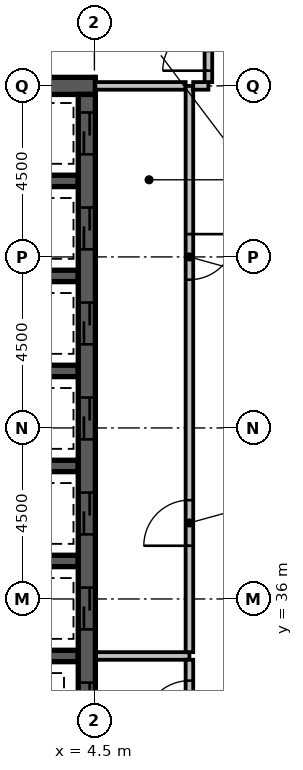
"""IFC4 building model, lengths in metres.
Left out: names, types, materials, properties, quantities, classifications, styles, units other than length and angle.
Written with IfcOpenShell. Run it as: python <this file> out.ifc"""

import sys

from ifc_helpers import new_model, si_unit, direction, frame, frame_2d, origin, place, context, subcontext, project, spatial, rectangle, extrude, element, fill, save


model = new_model("IFC4")
c1 = context("Model", 3, precision=1e-05, world=origin(), true_north=direction((0.0, 1.0)))
c2 = subcontext(c1, "Body", "Model", "MODEL_VIEW")
j1 = project(units=[si_unit("LENGTHUNIT", "METRE"), si_unit("PLANEANGLEUNIT", "RADIAN")], contexts=[c1])
p1 = place(None, origin())
s1 = spatial("IfcSite", under=j1, at=p1, CompositionType="ELEMENT")
p2 = place(p1, origin())
s2 = spatial("IfcBuilding", under=s1, at=p2, CompositionType="ELEMENT")
p3 = place(p2, frame((0.0, 0.0, 218.6)))
s3 = spatial("IfcBuildingStorey", under=s2, at=p3, CompositionType="ELEMENT", Elevation=218.6)
p4 = place(p3, frame((0.275, 49.5, -0.3), z_axis=(0.0, 0.0, 1.0), x_axis=(1.0, 0.0, 0.0)))
e1 = element("IfcWall", 1, at=p4, inside=s3, PredefinedType="SHEAR", context=c2, shape_type="SweptSolid", body=[
    extrude(rectangle(XDim=4.25, YDim=0.45, at=frame_2d((2.125, 0.0))), origin(), (0.0, 0.0, 1.0), 3.6),
])
for number, where, z_axis, x_axis in (
    (2, (0.725, 34.5, -0.3), (0.0, 0.0, 1.0), (1.0, 0.0, 0.0)),
    (3, (0.725, 37.0, -0.3), (0.0, 0.0, 1.0), (1.0, 0.0, 0.0)),
    (4, (0.725, 39.5, -0.3), (0.0, 0.0, 1.0), (1.0, 0.0, 0.0)),
    (5, (0.725, 42.0, -0.3), (0.0, 0.0, 1.0), (1.0, 0.0, 0.0)),
    (6, (0.725, 44.5, -0.3), (0.0, 0.0, 1.0), (1.0, 0.0, 0.0)),
    (7, (0.725, 47.0, -0.3), (0.0, 0.0, 1.0), (1.0, 0.0, 0.0)),
):
    element("IfcWall", number, at=place(p3, frame(where, z_axis=z_axis, x_axis=x_axis)), inside=s3, PredefinedType="SHEAR", context=c2, shape_type="SweptSolid", body=[
        extrude(rectangle(XDim=3.35, YDim=0.3, at=frame_2d((1.675, 0.0))), origin(), (0.0, 0.0, 1.0), 3.6),
    ])
p5 = place(p3, frame((4.3, 27.15, -0.3), z_axis=(0.0, 0.0, 1.0), x_axis=(0.0, 1.0, 0.0)))
e8 = element("IfcWall", 8, at=p5, inside=s3, PredefinedType="SHEAR", context=c2, shape_type="SweptSolid", body=[
    extrude(rectangle(XDim=22.125, YDim=0.45, at=frame_2d((11.062, 0.0))), origin(), (0.0, 0.0, 1.0), 3.6),
])
p6 = place(p5, frame((3.05, 0.0, 0.3)))
e9 = element("IfcOpeningElement", 9, at=p6, cuts=e8, PredefinedType="OPENING", context=c2, shape_type="SweptSolid", body=[
    extrude(rectangle(XDim=1.1, YDim=2.1, at=frame_2d((0.55, 1.05))), frame((0.0, 0.237, 0.0), z_axis=(0.0, -1.0, 0.0), x_axis=(1.0, 0.0, 0.0)), (0.0, 0.0, 1.0), 0.474),
])
p7 = place(p5, frame((0.55, 0.0, 0.3)))
e10 = element("IfcOpeningElement", 10, at=p7, cuts=e8, PredefinedType="OPENING", context=c2, shape_type="SweptSolid", body=[
    extrude(rectangle(XDim=1.1, YDim=2.1, at=frame_2d((0.55, 1.05))), frame((0.0, 0.237, 0.0), z_axis=(0.0, -1.0, 0.0), x_axis=(1.0, 0.0, 0.0)), (0.0, 0.0, 1.0), 0.474),
])
p8 = place(p5, frame((20.55, 0.0, 0.3)))
e11 = element("IfcOpeningElement", 11, at=p8, cuts=e8, PredefinedType="OPENING", context=c2, shape_type="SweptSolid", body=[
    extrude(rectangle(XDim=1.1, YDim=2.1, at=frame_2d((0.55, 1.05))), frame((0.0, 0.237, 0.0), z_axis=(0.0, -1.0, 0.0), x_axis=(1.0, 0.0, 0.0)), (0.0, 0.0, 1.0), 0.474),
])
p9 = place(p5, frame((18.05, 0.0, 0.3)))
e12 = element("IfcOpeningElement", 12, at=p9, cuts=e8, PredefinedType="OPENING", context=c2, shape_type="SweptSolid", body=[
    extrude(rectangle(XDim=1.1, YDim=2.1, at=frame_2d((0.55, 1.05))), frame((0.0, 0.237, 0.0), z_axis=(0.0, -1.0, 0.0), x_axis=(1.0, 0.0, 0.0)), (0.0, 0.0, 1.0), 0.474),
])
p10 = place(p5, frame((15.55, 0.0, 0.3)))
e13 = element("IfcOpeningElement", 13, at=p10, cuts=e8, PredefinedType="OPENING", context=c2, shape_type="SweptSolid", body=[
    extrude(rectangle(XDim=1.1, YDim=2.1, at=frame_2d((0.55, 1.05))), frame((0.0, 0.237, 0.0), z_axis=(0.0, -1.0, 0.0), x_axis=(1.0, 0.0, 0.0)), (0.0, 0.0, 1.0), 0.474),
])
p11 = place(p5, frame((13.05, 0.0, 0.3)))
e14 = element("IfcOpeningElement", 14, at=p11, cuts=e8, PredefinedType="OPENING", context=c2, shape_type="SweptSolid", body=[
    extrude(rectangle(XDim=1.1, YDim=2.1, at=frame_2d((0.55, 1.05))), frame((0.0, 0.237, 0.0), z_axis=(0.0, -1.0, 0.0), x_axis=(1.0, 0.0, 0.0)), (0.0, 0.0, 1.0), 0.474),
])
p12 = place(p5, frame((10.55, 0.0, 0.3)))
e15 = element("IfcOpeningElement", 15, at=p12, cuts=e8, PredefinedType="OPENING", context=c2, shape_type="SweptSolid", body=[
    extrude(rectangle(XDim=1.1, YDim=2.1, at=frame_2d((0.55, 1.05))), frame((0.0, 0.237, 0.0), z_axis=(0.0, -1.0, 0.0), x_axis=(1.0, 0.0, 0.0)), (0.0, 0.0, 1.0), 0.474),
])
p13 = place(p5, frame((8.05, 0.0, 0.3)))
e16 = element("IfcOpeningElement", 16, at=p13, cuts=e8, PredefinedType="OPENING", context=c2, shape_type="SweptSolid", body=[
    extrude(rectangle(XDim=1.1, YDim=2.1, at=frame_2d((0.55, 1.05))), frame((0.0, 0.237, 0.0), z_axis=(0.0, -1.0, 0.0), x_axis=(1.0, 0.0, 0.0)), (0.0, 0.0, 1.0), 0.474),
])
p14 = place(p5, frame((5.55, 0.0, 0.3)))
e17 = element("IfcOpeningElement", 17, at=p14, cuts=e8, PredefinedType="OPENING", context=c2, shape_type="SweptSolid", body=[
    extrude(rectangle(XDim=1.1, YDim=2.1, at=frame_2d((0.55, 1.05))), frame((0.0, 0.237, 0.0), z_axis=(0.0, -1.0, 0.0), x_axis=(1.0, 0.0, 0.0)), (0.0, 0.0, 1.0), 0.474),
])
p15 = place(p3, frame((4.545, 34.5, 0.0), z_axis=(0.0, 0.0, 1.0), x_axis=(1.0, 0.0, 0.0)))
e18 = element("IfcWall", 18, at=p15, inside=s3, PredefinedType="PARTITIONING", context=c2, shape_type="SweptSolid", body=[
    extrude(rectangle(XDim=2.455, YDim=0.2, at=frame_2d((1.228, 0.0))), origin(), (0.0, 0.0, 1.0), 3.3),
])
p16 = place(p3, frame((7.0, 34.6, 0.0), z_axis=(0.0, 0.0, 1.0), x_axis=(0.0, 1.0, 0.0)))
e19 = element("IfcWall", 19, at=p16, inside=s3, PredefinedType="PARTITIONING", context=c2, shape_type="SweptSolid", body=[
    extrude(rectangle(XDim=14.9, YDim=0.2, at=frame_2d((7.45, 0.0))), origin(), (0.0, 0.0, 1.0), 3.3),
])
p17 = place(p16, frame((2.8, 0.0, 0.0)))
e20 = element("IfcOpeningElement", 20, at=p17, cuts=e19, PredefinedType="OPENING", context=c2, shape_type="SweptSolid", body=[
    extrude(rectangle(XDim=1.2, YDim=2.1, at=frame_2d((0.6, 1.05))), frame((0.0, 0.112, 0.0), z_axis=(0.0, -1.0, 0.0), x_axis=(1.0, 0.0, 0.0)), (0.0, 0.0, 1.0), 0.224),
])
p18 = place(p16, frame((9.8, 0.0, 0.0)))
e21 = element("IfcOpeningElement", 21, at=p18, cuts=e19, PredefinedType="OPENING", context=c2, shape_type="SweptSolid", body=[
    extrude(rectangle(XDim=1.2, YDim=2.1, at=frame_2d((0.6, 1.05))), frame((0.0, 0.112, 0.0), z_axis=(0.0, -1.0, 0.0), x_axis=(1.0, 0.0, 0.0)), (0.0, 0.0, 1.0), 0.224),
])
p19 = place(p3, frame((4.525, 49.5, 0.0), z_axis=(0.0, 0.0, 1.0), x_axis=(1.0, 0.0, 0.0)))
e22 = element("IfcWall", 22, at=p19, inside=s3, PredefinedType="PARTITIONING", context=c2, shape_type="SweptSolid", body=[
    extrude(rectangle(XDim=2.375, YDim=0.2, at=frame_2d((1.188, 0.0))), origin(), (0.0, 0.0, 1.0), 3.3),
])
p20 = place(p3, frame((7.0, 32.1, 0.0), z_axis=(0.0, 0.0, 1.0), x_axis=(0.0, 1.0, 0.0)))
e23 = element("IfcWall", 23, at=p20, inside=s3, PredefinedType="PARTITIONING", context=c2, shape_type="SweptSolid", body=[
    extrude(rectangle(XDim=2.3, YDim=0.2, at=frame_2d((1.15, 0.0))), origin(), (0.0, 0.0, 1.0), 3.3),
])
p21 = place(p20, frame((0.55, 0.0, 0.0)))
e24 = element("IfcOpeningElement", 24, at=p21, cuts=e23, PredefinedType="OPENING", context=c2, shape_type="SweptSolid", body=[
    extrude(rectangle(XDim=1.2, YDim=2.1, at=frame_2d((0.6, 1.05))), frame((0.0, 0.112, 0.0), z_axis=(0.0, -1.0, 0.0), x_axis=(1.0, 0.0, 0.0)), (0.0, 0.0, 1.0), 0.224),
])
p22 = place(p3, frame((7.1, 49.5, 0.0), z_axis=(0.0, 0.0, 1.0), x_axis=(1.0, 0.0, 0.0)))
e25 = element("IfcWall", 25, at=p22, inside=s3, PredefinedType="PARTITIONING", context=c2, shape_type="SweptSolid", body=[
    extrude(rectangle(XDim=0.4, YDim=0.2, at=frame_2d((0.2, 0.0))), origin(), (0.0, 0.0, 1.0), 3.3),
])
p23 = place(p3, frame((7.5, 49.6, 0.0), z_axis=(0.0, 0.0, 1.0), x_axis=(0.0, 1.0, 0.0)))
e26 = element("IfcWall", 26, at=p23, inside=s3, PredefinedType="PARTITIONING", context=c2, shape_type="SweptSolid", body=[
    extrude(rectangle(XDim=3.9, YDim=0.2, at=frame_2d((1.95, 0.0))), origin(), (0.0, 0.0, 1.0), 3.3),
])
p24 = place(p23, frame((0.3, 0.0, 0.0)))
e27 = element("IfcOpeningElement", 27, at=p24, cuts=e26, PredefinedType="OPENING", context=c2, shape_type="SweptSolid", body=[
    extrude(rectangle(XDim=1.2, YDim=2.1, at=frame_2d((0.6, 1.05))), frame((0.0, 0.112, 0.0), z_axis=(0.0, -1.0, 0.0), x_axis=(1.0, 0.0, 0.0)), (0.0, 0.0, 1.0), 0.224),
])
p25 = place(p24, origin())
e28 = element("IfcDoor", 28, at=p25, inside=s3, OperationType="SINGLE_SWING_LEFT", PredefinedType="DOOR", context=c2, shape_type="SweptSolid", body=[
    extrude(rectangle(XDim=1.2, YDim=2.1, at=frame_2d((0.6, 1.05))), frame((0.0, 0.025, 0.0), z_axis=(0.0, -1.0, 0.0), x_axis=(1.0, 0.0, 0.0)), (0.0, 0.0, 1.0), 0.05),
])
fill(e27, e28)
p26 = place(p8, origin())
e29 = element("IfcDoor", 29, at=p26, inside=s3, OperationType="SLIDING_TO_LEFT", PredefinedType="DOOR", context=c2, shape_type="SweptSolid", body=[
    extrude(rectangle(XDim=1.1, YDim=2.1, at=frame_2d((0.55, 1.05))), frame((0.0, 0.025, 0.0), z_axis=(0.0, -1.0, 0.0), x_axis=(1.0, 0.0, 0.0)), (0.0, 0.0, 1.0), 0.05),
])
fill(e11, e29)
p27 = place(p9, origin())
e30 = element("IfcDoor", 30, at=p27, inside=s3, OperationType="SLIDING_TO_LEFT", PredefinedType="DOOR", context=c2, shape_type="SweptSolid", body=[
    extrude(rectangle(XDim=1.1, YDim=2.1, at=frame_2d((0.55, 1.05))), frame((0.0, 0.025, 0.0), z_axis=(0.0, -1.0, 0.0), x_axis=(1.0, 0.0, 0.0)), (0.0, 0.0, 1.0), 0.05),
])
fill(e12, e30)
p28 = place(p10, origin())
e31 = element("IfcDoor", 31, at=p28, inside=s3, OperationType="SLIDING_TO_LEFT", PredefinedType="DOOR", context=c2, shape_type="SweptSolid", body=[
    extrude(rectangle(XDim=1.1, YDim=2.1, at=frame_2d((0.55, 1.05))), frame((0.0, 0.025, 0.0), z_axis=(0.0, -1.0, 0.0), x_axis=(1.0, 0.0, 0.0)), (0.0, 0.0, 1.0), 0.05),
])
fill(e13, e31)
p29 = place(p11, origin())
e32 = element("IfcDoor", 32, at=p29, inside=s3, OperationType="SLIDING_TO_LEFT", PredefinedType="DOOR", context=c2, shape_type="SweptSolid", body=[
    extrude(rectangle(XDim=1.1, YDim=2.1, at=frame_2d((0.55, 1.05))), frame((0.0, 0.025, 0.0), z_axis=(0.0, -1.0, 0.0), x_axis=(1.0, 0.0, 0.0)), (0.0, 0.0, 1.0), 0.05),
])
fill(e14, e32)
p30 = place(p12, origin())
e33 = element("IfcDoor", 33, at=p30, inside=s3, OperationType="SLIDING_TO_LEFT", PredefinedType="DOOR", context=c2, shape_type="SweptSolid", body=[
    extrude(rectangle(XDim=1.1, YDim=2.1, at=frame_2d((0.55, 1.05))), frame((0.0, 0.025, 0.0), z_axis=(0.0, -1.0, 0.0), x_axis=(1.0, 0.0, 0.0)), (0.0, 0.0, 1.0), 0.05),
])
fill(e15, e33)
p31 = place(p13, origin())
e34 = element("IfcDoor", 34, at=p31, inside=s3, OperationType="SLIDING_TO_LEFT", PredefinedType="DOOR", context=c2, shape_type="SweptSolid", body=[
    extrude(rectangle(XDim=1.1, YDim=2.1, at=frame_2d((0.55, 1.05))), frame((0.0, 0.025, 0.0), z_axis=(0.0, -1.0, 0.0), x_axis=(1.0, 0.0, 0.0)), (0.0, 0.0, 1.0), 0.05),
])
fill(e16, e34)
p32 = place(p17, origin())
e35 = element("IfcDoor", 35, at=p32, inside=s3, OperationType="SINGLE_SWING_LEFT", PredefinedType="DOOR", context=c2, shape_type="SweptSolid", body=[
    extrude(rectangle(XDim=1.2, YDim=2.1, at=frame_2d((0.6, 1.05))), frame((0.0, 0.025, 0.0), z_axis=(0.0, -1.0, 0.0), x_axis=(1.0, 0.0, 0.0)), (0.0, 0.0, 1.0), 0.05),
])
fill(e20, e35)
p33 = place(p18, origin())
e36 = element("IfcDoor", 36, at=p33, inside=s3, OperationType="SINGLE_SWING_RIGHT", PredefinedType="DOOR", context=c2, shape_type="SweptSolid", body=[
    extrude(rectangle(XDim=1.2, YDim=2.1, at=frame_2d((0.6, 1.05))), frame((0.0, 0.025, 0.0), z_axis=(0.0, -1.0, 0.0), x_axis=(1.0, 0.0, 0.0)), (0.0, 0.0, 1.0), 0.05),
])
fill(e21, e36)
p34 = place(p21, origin())
e37 = element("IfcDoor", 37, at=p34, inside=s3, OperationType="SINGLE_SWING_LEFT", PredefinedType="DOOR", context=c2, shape_type="SweptSolid", body=[
    extrude(rectangle(XDim=1.2, YDim=2.1, at=frame_2d((0.6, 1.05))), frame((0.0, 0.025, 0.0), z_axis=(0.0, -1.0, 0.0), x_axis=(1.0, 0.0, 0.0)), (0.0, 0.0, 1.0), 0.05),
])
fill(e24, e37)
p35 = place(p14, origin())
e38 = element("IfcDoor", 38, at=p35, inside=s3, OperationType="SLIDING_TO_LEFT", PredefinedType="DOOR", context=c2, shape_type="SweptSolid", body=[
    extrude(rectangle(XDim=1.1, YDim=2.1, at=frame_2d((0.55, 1.05))), frame((0.0, 0.025, 0.0), z_axis=(0.0, -1.0, 0.0), x_axis=(1.0, 0.0, 0.0)), (0.0, 0.0, 1.0), 0.05),
])
fill(e17, e38)
save(model, sys.argv[1])
